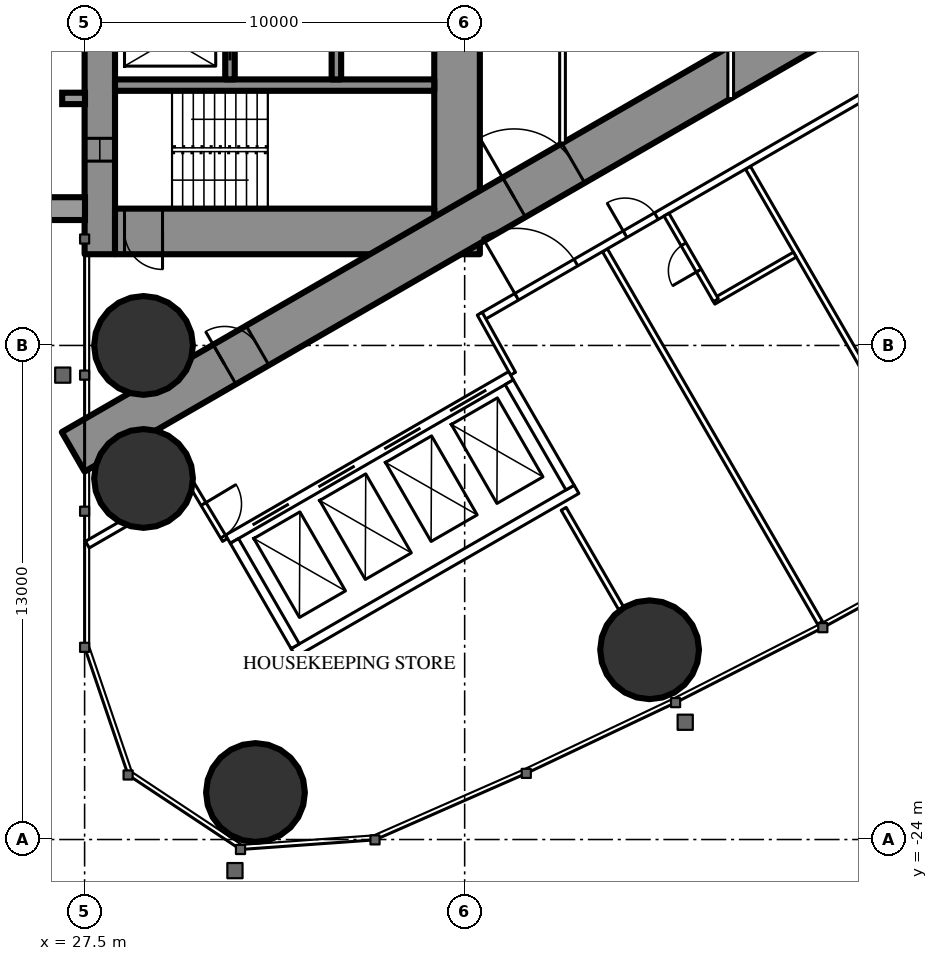
"""IFC4 building model, lengths in metres.
Left out: names, types, materials, properties, quantities, classifications, styles, units other than length and angle.
Written with IfcOpenShell. Run it as: python <this file> out.ifc"""

import sys

from ifc_helpers import new_model, si_unit, direction, frame, frame_2d, origin, origin_2d, place, context, subcontext, project, spatial, rectangle, hollow_circle, extrude, element, fill, save


model = new_model("IFC4")
c1 = context("Model", 3, precision=1e-05, world=origin(), true_north=direction((0.0, 1.0)))
c2 = subcontext(c1, "Body", "Model", "MODEL_VIEW")
j1 = project(units=[si_unit("LENGTHUNIT", "METRE"), si_unit("PLANEANGLEUNIT", "RADIAN")], contexts=[c1])
p1 = place(None, origin())
s1 = spatial("IfcSite", under=j1, at=p1, CompositionType="ELEMENT")
p2 = place(p1, origin())
s2 = spatial("IfcBuilding", under=s1, at=p2, CompositionType="ELEMENT")
p3 = place(p2, frame((0.0, 0.0, 111.6)))
s3 = spatial("IfcBuildingStorey", under=s2, at=p3, CompositionType="ELEMENT", Elevation=111.6)
for number, where, z_axis, x_axis in (
    (1, (31.996, -22.763, 0.0), (0.0, 0.0, 1.0), (1.0, 0.0, 0.0)),
    (2, (29.05, -11.0, 0.0), (0.0, 0.0, 1.0), (1.0, 0.0, 0.0)),
    (3, (29.05, -14.5, 0.0), (0.0, 0.0, 1.0), (1.0, 0.0, 0.0)),
    (4, (42.366, -19.007, 0.0), (0.0, 0.0, 1.0), (1.0, 0.0, 0.0)),
):
    element("IfcColumn", number, at=place(p3, frame(where, z_axis=z_axis, x_axis=x_axis)), inside=s3, PredefinedType="COLUMN", context=c2, shape_type="SweptSolid", body=[
        extrude(hollow_circle(Radius=1.3, WallThickness=0.1, at=origin_2d()), origin(), (0.0, 0.0, 1.0), 3.5),
    ])
p4 = place(p3, frame((27.9, -8.6, 0.0), z_axis=(0.0, 0.0, 1.0), x_axis=(0.0, 1.0, 0.0)))
e5 = element("IfcWall", 5, at=p4, inside=s3, PredefinedType="SHEAR", context=c2, shape_type="SweptSolid", body=[
    extrude(rectangle(XDim=17.2, YDim=0.8, at=frame_2d((8.6, 0.0))), origin(), (0.0, 0.0, 1.0), 3.5),
])
p5 = place(p4, frame((2.45, 0.0, 0.6)))
e6 = element("IfcOpeningElement", 6, at=p5, cuts=e5, PredefinedType="OPENING", context=c2, shape_type="SweptSolid", body=[
    extrude(rectangle(XDim=0.6, YDim=2.1, at=frame_2d((0.3, 1.05))), frame((0.0, 0.41, 0.0), z_axis=(0.0, -1.0, 0.0), x_axis=(1.0, 0.0, 0.0)), (0.0, 0.0, 1.0), 0.82),
])
p6 = place(p4, frame((14.15, 0.0, 0.6)))
e7 = element("IfcOpeningElement", 7, at=p6, cuts=e5, PredefinedType="OPENING", context=c2, shape_type="SweptSolid", body=[
    extrude(rectangle(XDim=0.6, YDim=2.1, at=frame_2d((0.3, 1.05))), frame((0.0, 0.41, 0.0), z_axis=(0.0, -1.0, 0.0), x_axis=(1.0, 0.0, 0.0)), (0.0, 0.0, 1.0), 0.82),
])
p7 = place(p3, frame((37.3, -8.6, 0.0), z_axis=(0.0, 0.0, 1.0), x_axis=(0.0, 1.0, 0.0)))
e8 = element("IfcWall", 8, at=p7, inside=s3, PredefinedType="SHEAR", context=c2, shape_type="SweptSolid", body=[
    extrude(rectangle(XDim=17.2, YDim=1.2, at=frame_2d((8.6, 0.0))), origin(), (0.0, 0.0, 1.0), 3.5),
])
p8 = place(p7, frame((7.7, 0.0, 0.0)))
e9 = element("IfcOpeningElement", 9, at=p8, cuts=e8, PredefinedType="OPENING", context=c2, shape_type="SweptSolid", body=[
    extrude(rectangle(XDim=1.8, YDim=2.2, at=frame_2d((0.9, 1.1))), frame((0.0, 0.61, 0.0), z_axis=(0.0, -1.0, 0.0), x_axis=(1.0, 0.0, 0.0)), (0.0, 0.0, 1.0), 1.22),
])
p9 = place(p3, frame((28.3, -8.0, 0.0), z_axis=(0.0, 0.0, 1.0), x_axis=(1.0, 0.0, 0.0)))
e10 = element("IfcWall", 10, at=p9, inside=s3, PredefinedType="SHEAR", context=c2, shape_type="SweptSolid", body=[
    extrude(rectangle(XDim=8.4, YDim=1.2, at=frame_2d((4.2, 0.0))), origin(), (0.0, 0.0, 1.0), 3.5),
])
p10 = place(p9, frame((0.25, 0.0, 0.0)))
e11 = element("IfcOpeningElement", 11, at=p10, cuts=e10, PredefinedType="OPENING", context=c2, shape_type="SweptSolid", body=[
    extrude(rectangle(XDim=1.0, YDim=2.2, at=frame_2d((0.5, 1.1))), frame((0.0, 0.61, 0.0), z_axis=(0.0, -1.0, 0.0), x_axis=(1.0, 0.0, 0.0)), (0.0, 0.0, 1.0), 1.22),
])
p11 = place(p3, frame((28.3, -4.15, 0.0), z_axis=(0.0, 0.0, 1.0), x_axis=(1.0, 0.0, 0.0)))
e12 = element("IfcWall", 12, at=p11, inside=s3, PredefinedType="SHEAR", context=c2, shape_type="SweptSolid", body=[
    extrude(rectangle(XDim=8.4, YDim=0.3, at=frame_2d((4.2, 0.0))), origin(), (0.0, 0.0, 1.0), 3.5),
])
p12 = place(p3, frame((31.325, -4.0, 0.0), z_axis=(0.0, 0.0, 1.0), x_axis=(0.0, 1.0, 0.0)))
e13 = element("IfcWall", 13, at=p12, inside=s3, PredefinedType="SHEAR", context=c2, shape_type="SweptSolid", body=[
    extrude(rectangle(XDim=2.1, YDim=0.25, at=frame_2d((1.05, 0.0))), origin(), (0.0, 0.0, 1.0), 3.5),
])
p13 = place(p12, frame((0.5, 0.0, 0.0)))
e14 = element("IfcOpeningElement", 14, at=p13, cuts=e13, PredefinedType="OPENING", context=c2, shape_type="SweptSolid", body=[
    extrude(rectangle(XDim=1.1, YDim=2.2, at=frame_2d((0.55, 1.1))), frame((0.0, 0.135, 0.0), z_axis=(0.0, -1.0, 0.0), x_axis=(1.0, 0.0, 0.0)), (0.0, 0.0, 1.0), 0.27),
])
p14 = place(p3, frame((34.125, -4.0, 0.0), z_axis=(0.0, 0.0, 1.0), x_axis=(0.0, 1.0, 0.0)))
e15 = element("IfcWall", 15, at=p14, inside=s3, PredefinedType="SHEAR", context=c2, shape_type="SweptSolid", body=[
    extrude(rectangle(XDim=2.35, YDim=0.25, at=frame_2d((1.175, 0.0))), origin(), (0.0, 0.0, 1.0), 3.5),
])
p15 = place(p14, frame((0.875, 0.0, 0.0)))
e16 = element("IfcOpeningElement", 16, at=p15, cuts=e15, PredefinedType="OPENING", context=c2, shape_type="SweptSolid", body=[
    extrude(rectangle(XDim=0.6, YDim=2.0, at=frame_2d((0.3, 1.0))), frame((0.0, 0.135, 0.0), z_axis=(0.0, -1.0, 0.0), x_axis=(1.0, 0.0, 0.0)), (0.0, 0.0, 1.0), 0.27),
])
p16 = place(p3, frame((27.2, -13.8, 0.0), z_axis=(0.0, 0.0, 1.0), x_axis=(0.866027159892, 0.499996958321, 0.0)))
e17 = element("IfcWall", 17, at=p16, inside=s3, PredefinedType="SHEAR", context=c2, shape_type="SweptSolid", body=[
    extrude(rectangle(XDim=27.947, YDim=1.2, at=frame_2d((13.973, 0.0))), origin(), (0.0, 0.0, 1.0), 3.5),
])
p17 = place(p16, frame((4.6, 0.0, 0.0)))
e18 = element("IfcOpeningElement", 18, at=p17, cuts=e17, PredefinedType="OPENING", context=c2, shape_type="SweptSolid", body=[
    extrude(rectangle(XDim=1.0, YDim=2.2, at=frame_2d((0.5, 1.1))), frame((0.0, 0.61, 0.0), z_axis=(0.0, -1.0, 0.0), x_axis=(1.0, 0.0, 0.0)), (0.0, 0.0, 1.0), 1.22),
])
p18 = place(p16, frame((13.395, 0.0, 0.0)))
e19 = element("IfcOpeningElement", 19, at=p18, cuts=e17, PredefinedType="OPENING", context=c2, shape_type="SweptSolid", body=[
    extrude(rectangle(XDim=1.8, YDim=2.2, at=frame_2d((0.9, 1.1))), frame((0.0, 0.61, 0.0), z_axis=(0.0, -1.0, 0.0), x_axis=(1.0, 0.0, 0.0)), (0.0, 0.0, 1.0), 1.22),
])
p19 = place(p3, frame((41.19, -8.494, 0.0), z_axis=(0.0, 0.0, 1.0), x_axis=(0.49999258054, -0.866029687369, 0.0)))
e20 = element("IfcWall", 20, at=p19, inside=s3, PredefinedType="PARTITIONING", context=c2, shape_type="SweptSolid", body=[
    extrude(rectangle(XDim=11.318, YDim=0.15, at=frame_2d((5.659, 0.0))), origin(), (0.0, 0.0, 1.0), 3.25),
])
p20 = place(p3, frame((44.954, -6.321, 0.0), z_axis=(0.0, 0.0, 1.0), x_axis=(0.500018676722, -0.866014620505, 0.0)))
e21 = element("IfcWall", 21, at=p20, inside=s3, PredefinedType="PARTITIONING", context=c2, shape_type="SweptSolid", body=[
    extrude(rectangle(XDim=8.704, YDim=0.15, at=frame_2d((4.352, 0.0))), origin(), (0.0, 0.0, 1.0), 2.2),
])
p21 = place(p3, frame((40.105, -15.299, 0.0), z_axis=(0.0, 0.0, 1.0), x_axis=(0.499978822259, -0.866037630414, 0.0)))
e22 = element("IfcWall", 22, at=p21, inside=s3, PredefinedType="PARTITIONING", context=c2, shape_type="SweptSolid", body=[
    extrude(rectangle(XDim=3.023, YDim=0.15, at=frame_2d((1.511, 0.0))), origin(), (0.0, 0.0, 1.0), 3.25),
])
p22 = place(p3, frame((27.572, -16.241, 0.0), z_axis=(0.0, 0.0, 1.0), x_axis=(0.866029654818, 0.499992636921, 0.0)))
e23 = element("IfcWall", 23, at=p22, inside=s3, PredefinedType="PARTITIONING", context=c2, shape_type="SweptSolid", body=[
    extrude(rectangle(XDim=3.155, YDim=0.2, at=frame_2d((1.577, 0.0))), origin(), (0.0, 0.0, 1.0), 3.25),
])
p23 = place(p3, frame((37.96, -10.243, 0.0), z_axis=(0.0, 0.0, 1.0), x_axis=(0.866026429433, 0.499998223521, 0.0)))
e24 = element("IfcWall", 24, at=p23, inside=s3, PredefinedType="PARTITIONING", context=c2, shape_type="SweptSolid", body=[
    extrude(rectangle(XDim=20.487, YDim=0.2, at=frame_2d((10.243, 0.0))), origin(), (0.0, 0.0, 1.0), 3.25),
])
p24 = place(p23, frame((4.343, 0.0, 0.0)))
e25 = element("IfcOpeningElement", 25, at=p24, cuts=e24, PredefinedType="OPENING", context=c2, shape_type="SweptSolid", body=[
    extrude(rectangle(XDim=0.95, YDim=2.2, at=frame_2d((0.475, 1.1))), frame((0.0, 0.11, 0.0), z_axis=(0.0, -1.0, 0.0), x_axis=(1.0, 0.0, 0.0)), (0.0, 0.0, 1.0), 0.22),
])
p25 = place(p23, frame((15.385, 0.0, 0.0)))
e26 = element("IfcOpeningElement", 26, at=p25, cuts=e24, PredefinedType="OPENING", context=c2, shape_type="SweptSolid", body=[
    extrude(rectangle(XDim=0.95, YDim=2.2, at=frame_2d((0.475, 1.1))), frame((0.0, 0.11, 0.0), z_axis=(0.0, -1.0, 0.0), x_axis=(1.0, 0.0, 0.0)), (0.0, 0.0, 1.0), 0.22),
])
p26 = place(p23, frame((17.085, 0.0, 0.0)))
e27 = element("IfcOpeningElement", 27, at=p26, cuts=e24, PredefinedType="OPENING", context=c2, shape_type="SweptSolid", body=[
    extrude(rectangle(XDim=0.95, YDim=2.2, at=frame_2d((0.475, 1.1))), frame((0.0, 0.11, 0.0), z_axis=(0.0, -1.0, 0.0), x_axis=(1.0, 0.0, 0.0)), (0.0, 0.0, 1.0), 0.22),
])
p27 = place(p23, frame((1.048, 0.0, 0.0)))
e28 = element("IfcOpeningElement", 28, at=p27, cuts=e24, PredefinedType="OPENING", context=c2, shape_type="SweptSolid", body=[
    extrude(rectangle(XDim=1.8, YDim=2.2, at=frame_2d((0.9, 1.1))), frame((0.0, 0.11, 0.0), z_axis=(0.0, -1.0, 0.0), x_axis=(1.0, 0.0, 0.0)), (0.0, 0.0, 1.0), 0.22),
])
p28 = place(p3, frame((30.267, -14.569, 0.0), z_axis=(0.0, 0.0, 1.0), x_axis=(0.514336634837, -0.857588377991, 0.0)))
e29 = element("IfcWall", 29, at=p28, inside=s3, PredefinedType="PARTITIONING", context=c2, shape_type="SweptSolid", body=[
    extrude(rectangle(XDim=1.805, YDim=0.15, at=frame_2d((0.903, 0.0))), origin(), (0.0, 0.0, 1.0), 3.25),
])
p29 = place(p28, frame((0.703, 0.0, 0.0)))
e30 = element("IfcOpeningElement", 30, at=p29, cuts=e29, PredefinedType="OPENING", context=c2, shape_type="SweptSolid", body=[
    extrude(rectangle(XDim=1.0, YDim=2.2, at=frame_2d((0.5, 1.1))), frame((0.0, 0.085, 0.0), z_axis=(0.0, -1.0, 0.0), x_axis=(1.0, 0.0, 0.0)), (0.0, 0.0, 1.0), 0.17),
])
p30 = place(p3, frame((38.773, -11.742, 0.0), z_axis=(0.0, 0.0, 1.0), x_axis=(-0.485528096672, 0.8742210632, 0.0)))
e31 = element("IfcWall", 31, at=p30, inside=s3, PredefinedType="PARTITIONING", context=c2, shape_type="SweptSolid", body=[
    extrude(rectangle(XDim=1.805, YDim=0.15, at=frame_2d((0.903, 0.0))), origin(), (0.0, 0.0, 1.0), 3.25),
])
p31 = place(p3, frame((44.045, -9.848, 0.0), z_axis=(0.0, 0.0, 1.0), x_axis=(0.866031185235, 0.4999899861, 0.0)))
e32 = element("IfcWall", 32, at=p31, inside=s3, PredefinedType="PARTITIONING", context=c2, shape_type="SweptSolid", body=[
    extrude(rectangle(XDim=2.475, YDim=0.15, at=frame_2d((1.238, 0.0))), origin(), (0.0, 0.0, 1.0), 3.25),
])
p32 = place(p3, frame((42.81, -7.559, 0.0), z_axis=(0.0, 0.0, 1.0), x_axis=(0.499936506574, -0.866062058628, 0.0)))
e33 = element("IfcWall", 33, at=p32, inside=s3, PredefinedType="PARTITIONING", context=c2, shape_type="SweptSolid", body=[
    extrude(rectangle(XDim=2.6, YDim=0.15, at=frame_2d((1.3, 0.0))), origin(), (0.0, 0.0, 1.0), 3.25),
])
p33 = place(p32, frame((0.9, 0.0, 0.0)))
e34 = element("IfcOpeningElement", 34, at=p33, cuts=e33, PredefinedType="OPENING", context=c2, shape_type="SweptSolid", body=[
    extrude(rectangle(XDim=0.8, YDim=2.2, at=frame_2d((0.4, 1.1))), frame((0.0, 0.085, 0.0), z_axis=(0.0, -1.0, 0.0), x_axis=(1.0, 0.0, 0.0)), (0.0, 0.0, 1.0), 0.17),
])
p34 = place(p3, frame((40.075, -5.674, 0.0), z_axis=(0.0, 0.0, 1.0), x_axis=(0.0, 1.0, 0.0)))
e35 = element("IfcWall", 35, at=p34, inside=s3, PredefinedType="PARTITIONING", context=c2, shape_type="SweptSolid", body=[
    extrude(rectangle(XDim=6.874, YDim=0.15, at=frame_2d((3.437, 0.0))), origin(), (0.0, 0.0, 1.0), 3.25),
])
p35 = place(p34, frame((2.537, 0.0, 0.0)))
e36 = element("IfcOpeningElement", 36, at=p35, cuts=e35, PredefinedType="OPENING", context=c2, shape_type="SweptSolid", body=[
    extrude(rectangle(XDim=1.8, YDim=2.2, at=frame_2d((0.9, 1.1))), frame((0.0, 0.085, 0.0), z_axis=(0.0, -1.0, 0.0), x_axis=(1.0, 0.0, 0.0)), (0.0, 0.0, 1.0), 0.17),
])
p36 = place(p3, frame((44.5, -4.505, 0.0), z_axis=(0.0, 0.0, 1.0), x_axis=(0.0, 1.0, 0.0)))
e37 = element("IfcWall", 37, at=p36, inside=s3, PredefinedType="PARTITIONING", context=c2, shape_type="SweptSolid", body=[
    extrude(rectangle(XDim=9.009, YDim=0.15, at=frame_2d((4.505, 0.0))), origin(), (0.0, 0.0, 1.0), 2.45),
])
p37 = place(p36, frame((1.752, 0.0, 0.0)))
e38 = element("IfcOpeningElement", 38, at=p37, cuts=e37, PredefinedType="OPENING", context=c2, shape_type="SweptSolid", body=[
    extrude(rectangle(XDim=1.0, YDim=2.2, at=frame_2d((0.5, 1.1))), frame((0.0, 0.085, 0.0), z_axis=(0.0, -1.0, 0.0), x_axis=(1.0, 0.0, 0.0)), (0.0, 0.0, 1.0), 0.17),
])
p38 = place(p36, frame((6.257, 0.0, 0.0)))
e39 = element("IfcOpeningElement", 39, at=p38, cuts=e37, PredefinedType="OPENING", context=c2, shape_type="SweptSolid", body=[
    extrude(rectangle(XDim=1.0, YDim=2.2, at=frame_2d((0.5, 1.1))), frame((0.0, 0.085, 0.0), z_axis=(0.0, -1.0, 0.0), x_axis=(1.0, 0.0, 0.0)), (0.0, 0.0, 1.0), 0.17),
])
p39 = place(p3, frame((31.271, -16.097, 0.0), z_axis=(0.0, 0.0, 1.0), x_axis=(0.86604045752, 0.499973925258, 0.0)))
e40 = element("IfcWall", 40, at=p39, inside=s3, PredefinedType="PARTITIONING", context=c2, shape_type="SweptSolid", body=[
    extrude(rectangle(XDim=8.6, YDim=0.25, at=frame_2d((4.3, 0.0))), origin(), (0.0, 0.0, 1.0), 3.25),
])
p40 = place(p39, frame((0.75, 0.0, 0.0)))
e41 = element("IfcOpeningElement", 41, at=p40, cuts=e40, PredefinedType="OPENING", context=c2, shape_type="SweptSolid", body=[
    extrude(rectangle(XDim=1.1, YDim=2.2, at=frame_2d((0.55, 1.1))), frame((0.0, 0.135, 0.0), z_axis=(0.0, -1.0, 0.0), x_axis=(1.0, 0.0, 0.0)), (0.0, 0.0, 1.0), 0.27),
])
p41 = place(p39, frame((2.75, 0.0, 0.0)))
e42 = element("IfcOpeningElement", 42, at=p41, cuts=e40, PredefinedType="OPENING", context=c2, shape_type="SweptSolid", body=[
    extrude(rectangle(XDim=1.1, YDim=2.2, at=frame_2d((0.55, 1.1))), frame((0.0, 0.135, 0.0), z_axis=(0.0, -1.0, 0.0), x_axis=(1.0, 0.0, 0.0)), (0.0, 0.0, 1.0), 0.27),
])
p42 = place(p39, frame((4.75, 0.0, 0.0)))
e43 = element("IfcOpeningElement", 43, at=p42, cuts=e40, PredefinedType="OPENING", context=c2, shape_type="SweptSolid", body=[
    extrude(rectangle(XDim=1.1, YDim=2.2, at=frame_2d((0.55, 1.1))), frame((0.0, 0.135, 0.0), z_axis=(0.0, -1.0, 0.0), x_axis=(1.0, 0.0, 0.0)), (0.0, 0.0, 1.0), 0.27),
])
p43 = place(p39, frame((6.75, 0.0, 0.0)))
e44 = element("IfcOpeningElement", 44, at=p43, cuts=e40, PredefinedType="OPENING", context=c2, shape_type="SweptSolid", body=[
    extrude(rectangle(XDim=1.1, YDim=2.2, at=frame_2d((0.55, 1.1))), frame((0.0, 0.135, 0.0), z_axis=(0.0, -1.0, 0.0), x_axis=(1.0, 0.0, 0.0)), (0.0, 0.0, 1.0), 0.27),
])
p44 = place(p3, frame((32.996, -19.086, 0.0), z_axis=(0.0, 0.0, 1.0), x_axis=(0.866028165386, 0.499995216735, 0.0)))
e45 = element("IfcWall", 45, at=p44, inside=s3, PredefinedType="PARTITIONING", context=c2, shape_type="SweptSolid", body=[
    extrude(rectangle(XDim=8.6, YDim=0.25, at=frame_2d((4.3, 0.0))), origin(), (0.0, 0.0, 1.0), 3.25),
])
for number, where, z_axis, x_axis in (
    (46, (31.441, -16.143, 0.0), (0.0, 0.0, 1.0), (0.5, -0.866, 0.0)),
    (47, (38.673, -11.968, 0.0), (0.0, 0.0, 1.0), (0.5, -0.866, 0.0)),
):
    element("IfcWall", number, at=place(p3, frame(where, z_axis=z_axis, x_axis=x_axis)), inside=s3, PredefinedType="PARTITIONING", context=c2, shape_type="SweptSolid", body=[
        extrude(rectangle(XDim=3.201, YDim=0.25, at=frame_2d((1.6, 0.0))), origin(), (0.0, 0.0, 1.0), 3.25),
    ])
p45 = place(p33, origin())
e48 = element("IfcDoor", 48, at=p45, inside=s3, OperationType="SINGLE_SWING_RIGHT", PredefinedType="DOOR", context=c2, shape_type="SweptSolid", body=[
    extrude(rectangle(XDim=0.8, YDim=2.2, at=frame_2d((0.4, 1.1))), frame((0.0, 0.025, 0.0), z_axis=(0.0, -1.0, 0.0), x_axis=(1.0, 0.0, 0.0)), (0.0, 0.0, 1.0), 0.05),
])
fill(e34, e48)
p46 = place(p24, origin())
e49 = element("IfcDoor", 49, at=p46, inside=s3, OperationType="SINGLE_SWING_LEFT", PredefinedType="DOOR", context=c2, shape_type="SweptSolid", body=[
    extrude(rectangle(XDim=0.95, YDim=2.2, at=frame_2d((0.475, 1.1))), frame((0.0, 0.025, 0.0), z_axis=(0.0, -1.0, 0.0), x_axis=(1.0, 0.0, 0.0)), (0.0, 0.0, 1.0), 0.05),
])
fill(e25, e49)
p47 = place(p29, origin())
e50 = element("IfcDoor", 50, at=p47, inside=s3, OperationType="SINGLE_SWING_LEFT", PredefinedType="DOOR", context=c2, shape_type="SweptSolid", body=[
    extrude(rectangle(XDim=1.0, YDim=2.2, at=frame_2d((0.5, 1.1))), frame((0.0, 0.025, 0.0), z_axis=(0.0, -1.0, 0.0), x_axis=(1.0, 0.0, 0.0)), (0.0, 0.0, 1.0), 0.05),
])
fill(e30, e50)
p48 = place(p27, origin())
e51 = element("IfcDoor", 51, at=p48, inside=s3, OperationType="DOUBLE_DOOR_SINGLE_SWING", PredefinedType="DOOR", context=c2, shape_type="SweptSolid", body=[
    extrude(rectangle(XDim=1.8, YDim=2.2, at=frame_2d((0.9, 1.1))), frame((0.0, 0.025, 0.0), z_axis=(0.0, -1.0, 0.0), x_axis=(1.0, 0.0, 0.0)), (0.0, 0.0, 1.0), 0.05),
])
fill(e28, e51)
p49 = place(p17, origin())
e52 = element("IfcDoor", 52, at=p49, inside=s3, OperationType="SINGLE_SWING_LEFT", PredefinedType="DOOR", context=c2, shape_type="SweptSolid", body=[
    extrude(rectangle(XDim=1.0, YDim=2.2, at=frame_2d((0.5, 1.1))), frame((0.0, 0.025, 0.0), z_axis=(0.0, -1.0, 0.0), x_axis=(1.0, 0.0, 0.0)), (0.0, 0.0, 1.0), 0.05),
])
fill(e18, e52)
p50 = place(p18, origin())
e53 = element("IfcDoor", 53, at=p50, inside=s3, OperationType="DOUBLE_DOOR_SINGLE_SWING", PredefinedType="DOOR", context=c2, shape_type="SweptSolid", body=[
    extrude(rectangle(XDim=1.8, YDim=2.2, at=frame_2d((0.9, 1.1))), frame((0.0, 0.025, 0.0), z_axis=(0.0, -1.0, 0.0), x_axis=(1.0, 0.0, 0.0)), (0.0, 0.0, 1.0), 0.05),
])
fill(e19, e53)
p51 = place(p10, origin())
e54 = element("IfcDoor", 54, at=p51, inside=s3, OperationType="SINGLE_SWING_RIGHT", PredefinedType="DOOR", context=c2, shape_type="SweptSolid", body=[
    extrude(rectangle(XDim=1.0, YDim=2.2, at=frame_2d((0.5, 1.1))), frame((0.0, 0.025, 0.0), z_axis=(0.0, -1.0, 0.0), x_axis=(1.0, 0.0, 0.0)), (0.0, 0.0, 1.0), 0.05),
])
fill(e11, e54)
p52 = place(p13, origin())
e55 = element("IfcDoor", 55, at=p52, inside=s3, OperationType="SLIDING_TO_LEFT", PredefinedType="USERDEFINED", context=c2, shape_type="SweptSolid", body=[
    extrude(rectangle(XDim=1.1, YDim=2.2, at=frame_2d((0.55, 1.1))), frame((0.0, 0.025, 0.0), z_axis=(0.0, -1.0, 0.0), x_axis=(1.0, 0.0, 0.0)), (0.0, 0.0, 1.0), 0.05),
])
fill(e14, e55)
p53 = place(p40, origin())
e56 = element("IfcDoor", 56, at=p53, inside=s3, OperationType="DOUBLE_DOOR_SLIDING", PredefinedType="USERDEFINED", context=c2, shape_type="SweptSolid", body=[
    extrude(rectangle(XDim=1.1, YDim=2.2, at=frame_2d((0.55, 1.1))), frame((0.0, 0.025, 0.0), z_axis=(0.0, -1.0, 0.0), x_axis=(1.0, 0.0, 0.0)), (0.0, 0.0, 1.0), 0.05),
])
fill(e41, e56)
p54 = place(p41, origin())
e57 = element("IfcDoor", 57, at=p54, inside=s3, OperationType="DOUBLE_DOOR_SLIDING", PredefinedType="USERDEFINED", context=c2, shape_type="SweptSolid", body=[
    extrude(rectangle(XDim=1.1, YDim=2.2, at=frame_2d((0.55, 1.1))), frame((0.0, 0.025, 0.0), z_axis=(0.0, -1.0, 0.0), x_axis=(1.0, 0.0, 0.0)), (0.0, 0.0, 1.0), 0.05),
])
fill(e42, e57)
p55 = place(p42, origin())
e58 = element("IfcDoor", 58, at=p55, inside=s3, OperationType="DOUBLE_DOOR_SLIDING", PredefinedType="USERDEFINED", context=c2, shape_type="SweptSolid", body=[
    extrude(rectangle(XDim=1.1, YDim=2.2, at=frame_2d((0.55, 1.1))), frame((0.0, 0.025, 0.0), z_axis=(0.0, -1.0, 0.0), x_axis=(1.0, 0.0, 0.0)), (0.0, 0.0, 1.0), 0.05),
])
fill(e43, e58)
p56 = place(p43, origin())
e59 = element("IfcDoor", 59, at=p56, inside=s3, OperationType="DOUBLE_DOOR_SLIDING", PredefinedType="USERDEFINED", context=c2, shape_type="SweptSolid", body=[
    extrude(rectangle(XDim=1.1, YDim=2.2, at=frame_2d((0.55, 1.1))), frame((0.0, 0.025, 0.0), z_axis=(0.0, -1.0, 0.0), x_axis=(1.0, 0.0, 0.0)), (0.0, 0.0, 1.0), 0.05),
])
fill(e44, e59)
p57 = place(p5, origin())
e60 = element("IfcWindow", 60, at=p57, inside=s3, PartitioningType="SINGLE_PANEL", PredefinedType="WINDOW", context=c2, shape_type="SweptSolid", body=[
    extrude(rectangle(XDim=0.6, YDim=2.1, at=frame_2d((0.3, 1.05))), frame((0.0, 0.03, 0.0), z_axis=(0.0, -1.0, 0.0), x_axis=(1.0, 0.0, 0.0)), (0.0, 0.0, 1.0), 0.06),
])
fill(e6, e60)
save(model, sys.argv[1])
